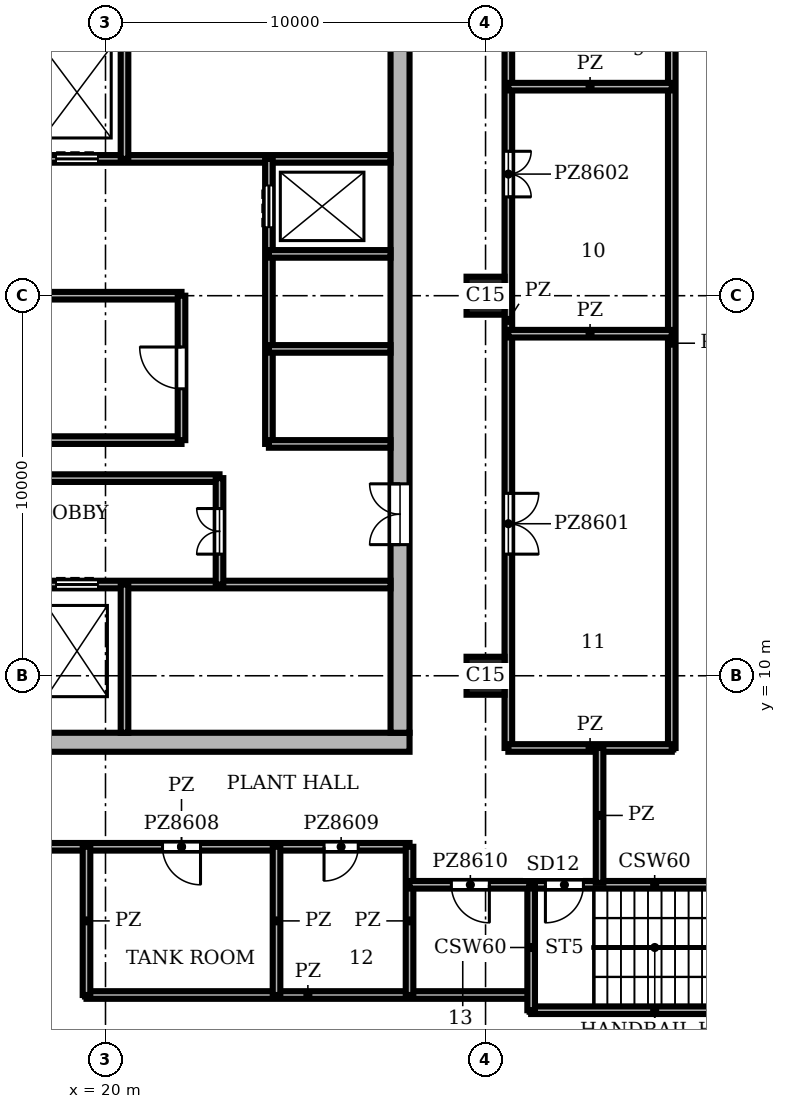
"""IFC4 building model, lengths in metres.
Left out: names, types, materials, properties, quantities, classifications, styles, units other than length and angle.
Written with IfcOpenShell. Run it as: python <this file> out.ifc"""

import sys

from ifc_helpers import new_model, si_unit, direction, frame, frame_2d, origin, origin_2d, place, context, subcontext, project, spatial, rectangle, extrude, element, fill, save


model = new_model("IFC4")
c1 = context("Model", 3, precision=1e-05, world=origin(), true_north=direction((0.0, 1.0)))
c2 = subcontext(c1, "Body", "Model", "MODEL_VIEW")
j1 = project(units=[si_unit("LENGTHUNIT", "METRE"), si_unit("PLANEANGLEUNIT", "RADIAN")], contexts=[c1])
p1 = place(None, origin())
s1 = spatial("IfcSite", under=j1, at=p1, CompositionType="ELEMENT")
p2 = place(p1, origin())
s2 = spatial("IfcBuilding", under=s1, at=p2, CompositionType="ELEMENT")
p3 = place(p2, frame((0.0, 0.0, 352.8)))
s3 = spatial("IfcBuildingStorey", under=s2, at=p3, CompositionType="ELEMENT", Elevation=352.8)
for number, where, z_axis, x_axis in (
    (1, (30.0, 10.0, 0.0), (0.0, 0.0, 1.0), (1.0, 0.0, 0.0)),
    (2, (30.0, 20.0, 0.0), (0.0, 0.0, 1.0), (1.0, 0.0, 0.0)),
):
    element("IfcColumn", number, at=place(p3, frame(where, z_axis=z_axis, x_axis=x_axis)), inside=s3, PredefinedType="COLUMN", context=c2, shape_type="SweptSolid", body=[
        extrude(rectangle(XDim=1.0, YDim=1.0, at=origin_2d()), origin(), (0.0, 0.0, 1.0), 5.4),
    ])
p4 = place(p3, frame((8.0, 8.25, 0.0), z_axis=(0.0, 0.0, 1.0), x_axis=(1.0, 0.0, 0.0)))
e3 = element("IfcWall", 3, at=p4, inside=s3, PredefinedType="SHEAR", context=c2, shape_type="SweptSolid", body=[
    extrude(rectangle(XDim=20.0, YDim=0.5, at=frame_2d((10.0, 0.0))), origin(), (0.0, 0.0, 1.0), 5.4),
])
p5 = place(p3, frame((27.75, 8.5, 0.0), z_axis=(0.0, 0.0, 1.0), x_axis=(0.0, 1.0, 0.0)))
e4 = element("IfcWall", 4, at=p5, inside=s3, PredefinedType="SHEAR", context=c2, shape_type="SweptSolid", body=[
    extrude(rectangle(XDim=19.0, YDim=0.5, at=frame_2d((9.5, 0.0))), origin(), (0.0, 0.0, 1.0), 5.4),
])
p6 = place(p5, frame((4.95, 0.0, 0.0)))
e5 = element("IfcOpeningElement", 5, at=p6, cuts=e4, PredefinedType="OPENING", context=c2, shape_type="SweptSolid", body=[
    extrude(rectangle(XDim=1.6, YDim=2.1, at=frame_2d((0.8, 1.05))), frame((0.0, 0.26, 0.0), z_axis=(0.0, -1.0, 0.0), x_axis=(1.0, 0.0, 0.0)), (0.0, 0.0, 1.0), 0.52),
])
p7 = place(p3, frame((31.2, 1.2, 0.0), z_axis=(0.0, 0.0, 1.0), x_axis=(1.0, 0.0, 0.0)))
e6 = element("IfcWall", 6, at=p7, inside=s3, PredefinedType="SHEAR", context=c2, shape_type="SweptSolid", body=[
    extrude(rectangle(XDim=6.5, YDim=0.2, at=frame_2d((3.25, 0.0))), origin(), (0.0, 0.0, 1.0), 5.0),
])
p8 = place(p3, frame((31.2, 4.5, 0.0), z_axis=(0.0, 0.0, 1.0), x_axis=(1.0, 0.0, 0.0)))
e7 = element("IfcWall", 7, at=p8, inside=s3, PredefinedType="SHEAR", context=c2, shape_type="SweptSolid", body=[
    extrude(rectangle(XDim=6.5, YDim=0.2, at=frame_2d((3.25, 0.0))), origin(), (0.0, 0.0, 1.0), 5.0),
])
p9 = place(p8, frame((0.375, 0.0, 0.0)))
e8 = element("IfcOpeningElement", 8, at=p9, cuts=e7, PredefinedType="OPENING", context=c2, shape_type="SweptSolid", body=[
    extrude(rectangle(XDim=1.0, YDim=2.1, at=frame_2d((0.5, 1.05))), frame((0.0, 0.11, 0.0), z_axis=(0.0, -1.0, 0.0), x_axis=(1.0, 0.0, 0.0)), (0.0, 0.0, 1.0), 0.22),
])
p10 = place(p3, frame((13.8, 12.4, 0.0), z_axis=(0.0, 0.0, 1.0), x_axis=(1.0, 0.0, 0.0)))
e9 = element("IfcWall", 9, at=p10, inside=s3, PredefinedType="SHEAR", context=c2, shape_type="SweptSolid", body=[
    extrude(rectangle(XDim=13.7, YDim=0.2, at=frame_2d((6.85, 0.0))), origin(), (0.0, 0.0, 1.0), 5.0),
])
p11 = place(p10, frame((2.4, 0.0, 0.0)))
e10 = element("IfcOpeningElement", 10, at=p11, cuts=e9, PredefinedType="OPENING", context=c2, shape_type="SweptSolid", body=[
    extrude(rectangle(XDim=1.1, YDim=2.1, at=frame_2d((0.55, 1.05))), frame((0.0, 0.11, 0.0), z_axis=(0.0, -1.0, 0.0), x_axis=(1.0, 0.0, 0.0)), (0.0, 0.0, 1.0), 0.22),
])
p12 = place(p10, frame((4.9, 0.0, 0.0)))
e11 = element("IfcOpeningElement", 11, at=p12, cuts=e9, PredefinedType="OPENING", context=c2, shape_type="SweptSolid", body=[
    extrude(rectangle(XDim=1.1, YDim=2.1, at=frame_2d((0.55, 1.05))), frame((0.0, 0.11, 0.0), z_axis=(0.0, -1.0, 0.0), x_axis=(1.0, 0.0, 0.0)), (0.0, 0.0, 1.0), 0.22),
])
p13 = place(p10, frame((0.15, 0.0, 0.0)))
e12 = element("IfcOpeningElement", 12, at=p13, cuts=e9, PredefinedType="OPENING", context=c2, shape_type="SweptSolid", body=[
    extrude(rectangle(XDim=1.0, YDim=2.1, at=frame_2d((0.5, 1.05))), frame((0.0, 0.11, 0.0), z_axis=(0.0, -1.0, 0.0), x_axis=(1.0, 0.0, 0.0)), (0.0, 0.0, 1.0), 0.22),
])
p14 = place(p3, frame((13.3, 15.2, 0.0), z_axis=(0.0, 0.0, 1.0), x_axis=(1.0, 0.0, 0.0)))
e13 = element("IfcWall", 13, at=p14, inside=s3, PredefinedType="SHEAR", context=c2, shape_type="SweptSolid", body=[
    extrude(rectangle(XDim=9.7, YDim=0.2, at=frame_2d((4.85, 0.0))), origin(), (0.0, 0.0, 1.0), 5.0),
])
p15 = place(p3, frame((24.3, 16.1, 0.0), z_axis=(0.0, 0.0, 1.0), x_axis=(1.0, 0.0, 0.0)))
e14 = element("IfcWall", 14, at=p15, inside=s3, PredefinedType="SHEAR", context=c2, shape_type="SweptSolid", body=[
    extrude(rectangle(XDim=3.2, YDim=0.2, at=frame_2d((1.6, 0.0))), origin(), (0.0, 0.0, 1.0), 5.0),
])
p16 = place(p3, frame((14.0, 16.2, 0.0), z_axis=(0.0, 0.0, 1.0), x_axis=(1.0, 0.0, 0.0)))
e15 = element("IfcWall", 15, at=p16, inside=s3, PredefinedType="SHEAR", context=c2, shape_type="SweptSolid", body=[
    extrude(rectangle(XDim=8.0, YDim=0.2, at=frame_2d((4.0, 0.0))), origin(), (0.0, 0.0, 1.0), 5.0),
])
p17 = place(p3, frame((24.3, 18.6, 0.0), z_axis=(0.0, 0.0, 1.0), x_axis=(1.0, 0.0, 0.0)))
e16 = element("IfcWall", 16, at=p17, inside=s3, PredefinedType="SHEAR", context=c2, shape_type="SweptSolid", body=[
    extrude(rectangle(XDim=3.2, YDim=0.2, at=frame_2d((1.6, 0.0))), origin(), (0.0, 0.0, 1.0), 5.0),
])
p18 = place(p3, frame((13.3, 20.0, 0.0), z_axis=(0.0, 0.0, 1.0), x_axis=(1.0, 0.0, 0.0)))
e17 = element("IfcWall", 17, at=p18, inside=s3, PredefinedType="SHEAR", context=c2, shape_type="SweptSolid", body=[
    extrude(rectangle(XDim=8.7, YDim=0.2, at=frame_2d((4.35, 0.0))), origin(), (0.0, 0.0, 1.0), 5.0),
])
p19 = place(p3, frame((24.3, 21.1, 0.0), z_axis=(0.0, 0.0, 1.0), x_axis=(1.0, 0.0, 0.0)))
e18 = element("IfcWall", 18, at=p19, inside=s3, PredefinedType="SHEAR", context=c2, shape_type="SweptSolid", body=[
    extrude(rectangle(XDim=3.2, YDim=0.2, at=frame_2d((1.6, 0.0))), origin(), (0.0, 0.0, 1.0), 5.0),
])
p20 = place(p3, frame((13.8, 23.6, 0.0), z_axis=(0.0, 0.0, 1.0), x_axis=(1.0, 0.0, 0.0)))
e19 = element("IfcWall", 19, at=p20, inside=s3, PredefinedType="SHEAR", context=c2, shape_type="SweptSolid", body=[
    extrude(rectangle(XDim=13.7, YDim=0.2, at=frame_2d((6.85, 0.0))), origin(), (0.0, 0.0, 1.0), 5.0),
])
p21 = place(p20, frame((2.4, 0.0, 0.0)))
e20 = element("IfcOpeningElement", 20, at=p21, cuts=e19, PredefinedType="OPENING", context=c2, shape_type="SweptSolid", body=[
    extrude(rectangle(XDim=1.1, YDim=2.1, at=frame_2d((0.55, 1.05))), frame((0.0, 0.11, 0.0), z_axis=(0.0, -1.0, 0.0), x_axis=(1.0, 0.0, 0.0)), (0.0, 0.0, 1.0), 0.22),
])
p22 = place(p20, frame((4.9, 0.0, 0.0)))
e21 = element("IfcOpeningElement", 21, at=p22, cuts=e19, PredefinedType="OPENING", context=c2, shape_type="SweptSolid", body=[
    extrude(rectangle(XDim=1.1, YDim=2.1, at=frame_2d((0.55, 1.05))), frame((0.0, 0.11, 0.0), z_axis=(0.0, -1.0, 0.0), x_axis=(1.0, 0.0, 0.0)), (0.0, 0.0, 1.0), 0.22),
])
p23 = place(p20, frame((0.15, 0.0, 0.0)))
e22 = element("IfcOpeningElement", 22, at=p23, cuts=e19, PredefinedType="OPENING", context=c2, shape_type="SweptSolid", body=[
    extrude(rectangle(XDim=1.0, YDim=2.1, at=frame_2d((0.5, 1.05))), frame((0.0, 0.11, 0.0), z_axis=(0.0, -1.0, 0.0), x_axis=(1.0, 0.0, 0.0)), (0.0, 0.0, 1.0), 0.22),
])
for number, where, z_axis, x_axis in (
    (23, (20.5, 8.5, 0.0), (0.0, 0.0, 1.0), (0.0, 1.0, 0.0)),
    (24, (20.5, 23.6, 0.0), (0.0, 0.0, 1.0), (0.0, 1.0, 0.0)),
):
    element("IfcWall", number, at=place(p3, frame(where, z_axis=z_axis, x_axis=x_axis)), inside=s3, PredefinedType="SHEAR", context=c2, shape_type="SweptSolid", body=[
        extrude(rectangle(XDim=3.9, YDim=0.2, at=frame_2d((1.95, 0.0))), origin(), (0.0, 0.0, 1.0), 5.0),
    ])
p24 = place(p3, frame((22.0, 16.2, 0.0), z_axis=(0.0, 0.0, 1.0), x_axis=(0.0, 1.0, 0.0)))
e25 = element("IfcWall", 25, at=p24, inside=s3, PredefinedType="SHEAR", context=c2, shape_type="SweptSolid", body=[
    extrude(rectangle(XDim=3.8, YDim=0.2, at=frame_2d((1.9, 0.0))), origin(), (0.0, 0.0, 1.0), 5.0),
])
p25 = place(p24, frame((1.35, 0.0, 0.0)))
e26 = element("IfcOpeningElement", 26, at=p25, cuts=e25, PredefinedType="OPENING", context=c2, shape_type="SweptSolid", body=[
    extrude(rectangle(XDim=1.1, YDim=2.1, at=frame_2d((0.55, 1.05))), frame((0.0, 0.11, 0.0), z_axis=(0.0, -1.0, 0.0), x_axis=(1.0, 0.0, 0.0)), (0.0, 0.0, 1.0), 0.22),
])
p26 = place(p3, frame((23.0, 12.4, 0.0), z_axis=(0.0, 0.0, 1.0), x_axis=(0.0, 1.0, 0.0)))
e27 = element("IfcWall", 27, at=p26, inside=s3, PredefinedType="SHEAR", context=c2, shape_type="SweptSolid", body=[
    extrude(rectangle(XDim=2.8, YDim=0.2, at=frame_2d((1.4, 0.0))), origin(), (0.0, 0.0, 1.0), 5.0),
])
p27 = place(p26, frame((0.8, 0.0, 0.0)))
e28 = element("IfcOpeningElement", 28, at=p27, cuts=e27, PredefinedType="OPENING", context=c2, shape_type="SweptSolid", body=[
    extrude(rectangle(XDim=1.2, YDim=2.1, at=frame_2d((0.6, 1.05))), frame((0.0, 0.11, 0.0), z_axis=(0.0, -1.0, 0.0), x_axis=(1.0, 0.0, 0.0)), (0.0, 0.0, 1.0), 0.22),
])
p28 = place(p3, frame((24.3, 16.1, 0.0), z_axis=(0.0, 0.0, 1.0), x_axis=(0.0, 1.0, 0.0)))
e29 = element("IfcWall", 29, at=p28, inside=s3, PredefinedType="SHEAR", context=c2, shape_type="SweptSolid", body=[
    extrude(rectangle(XDim=7.5, YDim=0.2, at=frame_2d((3.75, 0.0))), origin(), (0.0, 0.0, 1.0), 5.0),
])
p29 = place(p28, frame((5.7, 0.0, 0.0)))
e30 = element("IfcOpeningElement", 30, at=p29, cuts=e29, PredefinedType="OPENING", context=c2, shape_type="SweptSolid", body=[
    extrude(rectangle(XDim=1.1, YDim=2.1, at=frame_2d((0.55, 1.05))), frame((0.0, 0.11, 0.0), z_axis=(0.0, -1.0, 0.0), x_axis=(1.0, 0.0, 0.0)), (0.0, 0.0, 1.0), 0.22),
])
p30 = place(p3, frame((31.2, 1.2, 0.0), z_axis=(0.0, 0.0, 1.0), x_axis=(0.0, 1.0, 0.0)))
e31 = element("IfcWall", 31, at=p30, inside=s3, PredefinedType="SHEAR", context=c2, shape_type="SweptSolid", body=[
    extrude(rectangle(XDim=3.3, YDim=0.2, at=frame_2d((1.65, 0.0))), origin(), (0.0, 0.0, 1.0), 5.0),
])
p31 = place(p3, frame((16.0, 5.5, 0.0), z_axis=(0.0, 0.0, 1.0), x_axis=(1.0, 0.0, 0.0)))
e32 = element("IfcWall", 32, at=p31, inside=s3, PredefinedType="PARTITIONING", context=c2, shape_type="SweptSolid", body=[
    extrude(rectangle(XDim=12.0, YDim=0.2, at=frame_2d((6.0, 0.0))), origin(), (0.0, 0.0, 1.0), 5.0),
])
p32 = place(p31, frame((5.5, 0.0, 0.0)))
e33 = element("IfcOpeningElement", 33, at=p32, cuts=e32, PredefinedType="OPENING", context=c2, shape_type="SweptSolid", body=[
    extrude(rectangle(XDim=1.0, YDim=2.1, at=frame_2d((0.5, 1.05))), frame((0.0, 0.11, 0.0), z_axis=(0.0, -1.0, 0.0), x_axis=(1.0, 0.0, 0.0)), (0.0, 0.0, 1.0), 0.22),
])
p33 = place(p31, frame((9.75, 0.0, 0.0)))
e34 = element("IfcOpeningElement", 34, at=p33, cuts=e32, PredefinedType="OPENING", context=c2, shape_type="SweptSolid", body=[
    extrude(rectangle(XDim=0.9, YDim=2.1, at=frame_2d((0.45, 1.05))), frame((0.0, 0.11, 0.0), z_axis=(0.0, -1.0, 0.0), x_axis=(1.0, 0.0, 0.0)), (0.0, 0.0, 1.0), 0.22),
])
p34 = place(p3, frame((19.5, 1.6, 0.0), z_axis=(0.0, 0.0, 1.0), x_axis=(1.0, 0.0, 0.0)))
e35 = element("IfcWall", 35, at=p34, inside=s3, PredefinedType="PARTITIONING", context=c2, shape_type="SweptSolid", body=[
    extrude(rectangle(XDim=11.65, YDim=0.2, at=frame_2d((5.825, 0.0))), origin(), (0.0, 0.0, 1.0), 5.0),
])
p35 = place(p3, frame((28.0, 4.5, 0.0), z_axis=(0.0, 0.0, 1.0), x_axis=(1.0, 0.0, 0.0)))
e36 = element("IfcWall", 36, at=p35, inside=s3, PredefinedType="PARTITIONING", context=c2, shape_type="SweptSolid", body=[
    extrude(rectangle(XDim=3.15, YDim=0.2, at=frame_2d((1.575, 0.0))), origin(), (0.0, 0.0, 1.0), 5.0),
])
p36 = place(p35, frame((1.1, 0.0, 0.0)))
e37 = element("IfcOpeningElement", 37, at=p36, cuts=e36, PredefinedType="OPENING", context=c2, shape_type="SweptSolid", body=[
    extrude(rectangle(XDim=1.0, YDim=2.1, at=frame_2d((0.5, 1.05))), frame((0.0, 0.11, 0.0), z_axis=(0.0, -1.0, 0.0), x_axis=(1.0, 0.0, 0.0)), (0.0, 0.0, 1.0), 0.22),
])
for number, where, z_axis, x_axis in (
    (38, (30.6, 8.1, 0.0), (0.0, 0.0, 1.0), (1.0, 0.0, 0.0)),
    (39, (30.6, 19.0, 0.0), (0.0, 0.0, 1.0), (1.0, 0.0, 0.0)),
    (40, (30.6, 25.5, 0.0), (0.0, 0.0, 1.0), (1.0, 0.0, 0.0)),
):
    element("IfcWall", number, at=place(p3, frame(where, z_axis=z_axis, x_axis=x_axis)), inside=s3, PredefinedType="PARTITIONING", context=c2, shape_type="SweptSolid", body=[
        extrude(rectangle(XDim=4.3, YDim=0.2, at=frame_2d((2.15, 0.0))), origin(), (0.0, 0.0, 1.0), 5.0),
    ])
for number, where, z_axis, x_axis in (
    (41, (19.5, 1.6, 0.0), (0.0, 0.0, 1.0), (0.0, 1.0, 0.0)),
    (42, (24.5, 1.6, 0.0), (0.0, 0.0, 1.0), (0.0, 1.0, 0.0)),
    (43, (28.0, 1.6, 0.0), (0.0, 0.0, 1.0), (0.0, 1.0, 0.0)),
):
    element("IfcWall", number, at=place(p3, frame(where, z_axis=z_axis, x_axis=x_axis)), inside=s3, PredefinedType="PARTITIONING", context=c2, shape_type="SweptSolid", body=[
        extrude(rectangle(XDim=3.9, YDim=0.2, at=frame_2d((1.95, 0.0))), origin(), (0.0, 0.0, 1.0), 5.0),
    ])
p37 = place(p3, frame((30.6, 8.1, 0.0), z_axis=(0.0, 0.0, 1.0), x_axis=(0.0, 1.0, 0.0)))
e44 = element("IfcWall", 44, at=p37, inside=s3, PredefinedType="PARTITIONING", context=c2, shape_type="SweptSolid", body=[
    extrude(rectangle(XDim=22.5, YDim=0.2, at=frame_2d((11.25, 0.0))), origin(), (0.0, 0.0, 1.0), 5.0),
])
p38 = place(p37, frame((5.1, 0.0, 0.0)))
e45 = element("IfcOpeningElement", 45, at=p38, cuts=e44, PredefinedType="OPENING", context=c2, shape_type="SweptSolid", body=[
    extrude(rectangle(XDim=1.6, YDim=2.1, at=frame_2d((0.8, 1.05))), frame((0.0, 0.11, 0.0), z_axis=(0.0, -1.0, 0.0), x_axis=(1.0, 0.0, 0.0)), (0.0, 0.0, 1.0), 0.22),
])
p39 = place(p37, frame((14.5, 0.0, 0.0)))
e46 = element("IfcOpeningElement", 46, at=p39, cuts=e44, PredefinedType="OPENING", context=c2, shape_type="SweptSolid", body=[
    extrude(rectangle(XDim=1.2, YDim=2.1, at=frame_2d((0.6, 1.05))), frame((0.0, 0.11, 0.0), z_axis=(0.0, -1.0, 0.0), x_axis=(1.0, 0.0, 0.0)), (0.0, 0.0, 1.0), 0.22),
])
p40 = place(p37, frame((18.9, 0.0, 0.0)))
e47 = element("IfcOpeningElement", 47, at=p40, cuts=e44, PredefinedType="OPENING", context=c2, shape_type="SweptSolid", body=[
    extrude(rectangle(XDim=1.0, YDim=2.1, at=frame_2d((0.5, 1.05))), frame((0.0, 0.11, 0.0), z_axis=(0.0, -1.0, 0.0), x_axis=(1.0, 0.0, 0.0)), (0.0, 0.0, 1.0), 0.22),
])
p41 = place(p3, frame((33.0, 4.55, 0.0), z_axis=(0.0, 0.0, 1.0), x_axis=(0.0, 1.0, 0.0)))
e48 = element("IfcWall", 48, at=p41, inside=s3, PredefinedType="PARTITIONING", context=c2, shape_type="SweptSolid", body=[
    extrude(rectangle(XDim=3.55, YDim=0.2, at=frame_2d((1.775, 0.0))), origin(), (0.0, 0.0, 1.0), 5.0),
])
p42 = place(p3, frame((34.9, 8.1, 0.0), z_axis=(0.0, 0.0, 1.0), x_axis=(0.0, 1.0, 0.0)))
e49 = element("IfcWall", 49, at=p42, inside=s3, PredefinedType="PARTITIONING", context=c2, shape_type="SweptSolid", body=[
    extrude(rectangle(XDim=21.3, YDim=0.2, at=frame_2d((10.65, 0.0))), origin(), (0.0, 0.0, 1.0), 5.0),
])
p43 = place(p29, origin())
e50 = element("IfcDoor", 50, at=p43, inside=s3, OperationType="DOUBLE_DOOR_SLIDING", PredefinedType="DOOR", context=c2, shape_type="SweptSolid", body=[
    extrude(rectangle(XDim=1.1, YDim=2.1, at=frame_2d((0.55, 1.05))), frame((0.0, 0.025, 0.0), z_axis=(0.0, -1.0, 0.0), x_axis=(1.0, 0.0, 0.0)), (0.0, 0.0, 1.0), 0.05),
])
fill(e30, e50)
p44 = place(p12, origin())
e51 = element("IfcDoor", 51, at=p44, inside=s3, OperationType="DOUBLE_DOOR_SLIDING", PredefinedType="DOOR", context=c2, shape_type="SweptSolid", body=[
    extrude(rectangle(XDim=1.1, YDim=2.1, at=frame_2d((0.55, 1.05))), frame((0.0, 0.025, 0.0), z_axis=(0.0, -1.0, 0.0), x_axis=(1.0, 0.0, 0.0)), (0.0, 0.0, 1.0), 0.05),
])
fill(e11, e51)
p45 = place(p22, origin())
e52 = element("IfcDoor", 52, at=p45, inside=s3, OperationType="DOUBLE_DOOR_SLIDING", PredefinedType="DOOR", context=c2, shape_type="SweptSolid", body=[
    extrude(rectangle(XDim=1.1, YDim=2.1, at=frame_2d((0.55, 1.05))), frame((0.0, 0.025, 0.0), z_axis=(0.0, -1.0, 0.0), x_axis=(1.0, 0.0, 0.0)), (0.0, 0.0, 1.0), 0.05),
])
fill(e21, e52)
p46 = place(p9, frame((1.0, 0.0, 0.0), z_axis=(0.0, 0.0, 1.0), x_axis=(-1.0, 0.0, 0.0)))
e53 = element("IfcDoor", 53, at=p46, inside=s3, OperationType="SINGLE_SWING_RIGHT", PredefinedType="DOOR", context=c2, shape_type="SweptSolid", body=[
    extrude(rectangle(XDim=1.0, YDim=2.1, at=frame_2d((0.5, 1.05))), frame((0.0, 0.025, 0.0), z_axis=(0.0, -1.0, 0.0), x_axis=(1.0, 0.0, 0.0)), (0.0, 0.0, 1.0), 0.05),
])
fill(e8, e53)
p47 = place(p27, origin())
e54 = element("IfcDoor", 54, at=p47, inside=s3, OperationType="DOUBLE_DOOR_SINGLE_SWING", PredefinedType="DOOR", context=c2, shape_type="SweptSolid", body=[
    extrude(rectangle(XDim=1.2, YDim=2.1, at=frame_2d((0.6, 1.05))), frame((0.0, 0.025, 0.0), z_axis=(0.0, -1.0, 0.0), x_axis=(1.0, 0.0, 0.0)), (0.0, 0.0, 1.0), 0.05),
])
fill(e28, e54)
p48 = place(p25, origin())
e55 = element("IfcDoor", 55, at=p48, inside=s3, OperationType="SINGLE_SWING_RIGHT", PredefinedType="DOOR", context=c2, shape_type="SweptSolid", body=[
    extrude(rectangle(XDim=1.1, YDim=2.1, at=frame_2d((0.55, 1.05))), frame((0.0, 0.025, 0.0), z_axis=(0.0, -1.0, 0.0), x_axis=(1.0, 0.0, 0.0)), (0.0, 0.0, 1.0), 0.05),
])
fill(e26, e55)
p49 = place(p6, origin())
e56 = element("IfcDoor", 56, at=p49, inside=s3, OperationType="DOUBLE_DOOR_SINGLE_SWING", PredefinedType="DOOR", context=c2, shape_type="SweptSolid", body=[
    extrude(rectangle(XDim=1.6, YDim=2.1, at=frame_2d((0.8, 1.05))), frame((0.0, 0.025, 0.0), z_axis=(0.0, -1.0, 0.0), x_axis=(1.0, 0.0, 0.0)), (0.0, 0.0, 1.0), 0.05),
])
fill(e5, e56)
p50 = place(p38, frame((1.6, 0.0, 0.0), z_axis=(0.0, 0.0, 1.0), x_axis=(-1.0, 0.0, 0.0)))
e57 = element("IfcDoor", 57, at=p50, inside=s3, OperationType="DOUBLE_DOOR_DOUBLE_SWING", PredefinedType="DOOR", context=c2, shape_type="SweptSolid", body=[
    extrude(rectangle(XDim=1.6, YDim=2.1, at=frame_2d((0.8, 1.05))), frame((0.0, 0.025, 0.0), z_axis=(0.0, -1.0, 0.0), x_axis=(1.0, 0.0, 0.0)), (0.0, 0.0, 1.0), 0.05),
])
fill(e45, e57)
p51 = place(p39, frame((1.2, 0.0, 0.0), z_axis=(0.0, 0.0, 1.0), x_axis=(-1.0, 0.0, 0.0)))
e58 = element("IfcDoor", 58, at=p51, inside=s3, OperationType="DOUBLE_DOOR_SINGLE_SWING", PredefinedType="DOOR", context=c2, shape_type="SweptSolid", body=[
    extrude(rectangle(XDim=1.2, YDim=2.1, at=frame_2d((0.6, 1.05))), frame((0.0, 0.025, 0.0), z_axis=(0.0, -1.0, 0.0), x_axis=(1.0, 0.0, 0.0)), (0.0, 0.0, 1.0), 0.05),
])
fill(e46, e58)
p52 = place(p32, frame((1.0, 0.0, 0.0), z_axis=(0.0, 0.0, 1.0), x_axis=(-1.0, 0.0, 0.0)))
e59 = element("IfcDoor", 59, at=p52, inside=s3, OperationType="SINGLE_SWING_LEFT", PredefinedType="DOOR", context=c2, shape_type="SweptSolid", body=[
    extrude(rectangle(XDim=1.0, YDim=2.1, at=frame_2d((0.5, 1.05))), frame((0.0, 0.025, 0.0), z_axis=(0.0, -1.0, 0.0), x_axis=(1.0, 0.0, 0.0)), (0.0, 0.0, 1.0), 0.05),
])
fill(e33, e59)
p53 = place(p33, frame((0.9, 0.0, 0.0), z_axis=(0.0, 0.0, 1.0), x_axis=(-1.0, 0.0, 0.0)))
e60 = element("IfcDoor", 60, at=p53, inside=s3, OperationType="SINGLE_SWING_RIGHT", PredefinedType="DOOR", context=c2, shape_type="SweptSolid", body=[
    extrude(rectangle(XDim=0.9, YDim=2.1, at=frame_2d((0.45, 1.05))), frame((0.0, 0.025, 0.0), z_axis=(0.0, -1.0, 0.0), x_axis=(1.0, 0.0, 0.0)), (0.0, 0.0, 1.0), 0.05),
])
fill(e34, e60)
p54 = place(p36, frame((1.0, 0.0, 0.0), z_axis=(0.0, 0.0, 1.0), x_axis=(-1.0, 0.0, 0.0)))
e61 = element("IfcDoor", 61, at=p54, inside=s3, OperationType="SINGLE_SWING_LEFT", PredefinedType="DOOR", context=c2, shape_type="SweptSolid", body=[
    extrude(rectangle(XDim=1.0, YDim=2.1, at=frame_2d((0.5, 1.05))), frame((0.0, 0.025, 0.0), z_axis=(0.0, -1.0, 0.0), x_axis=(1.0, 0.0, 0.0)), (0.0, 0.0, 1.0), 0.05),
])
fill(e37, e61)
save(model, sys.argv[1])
